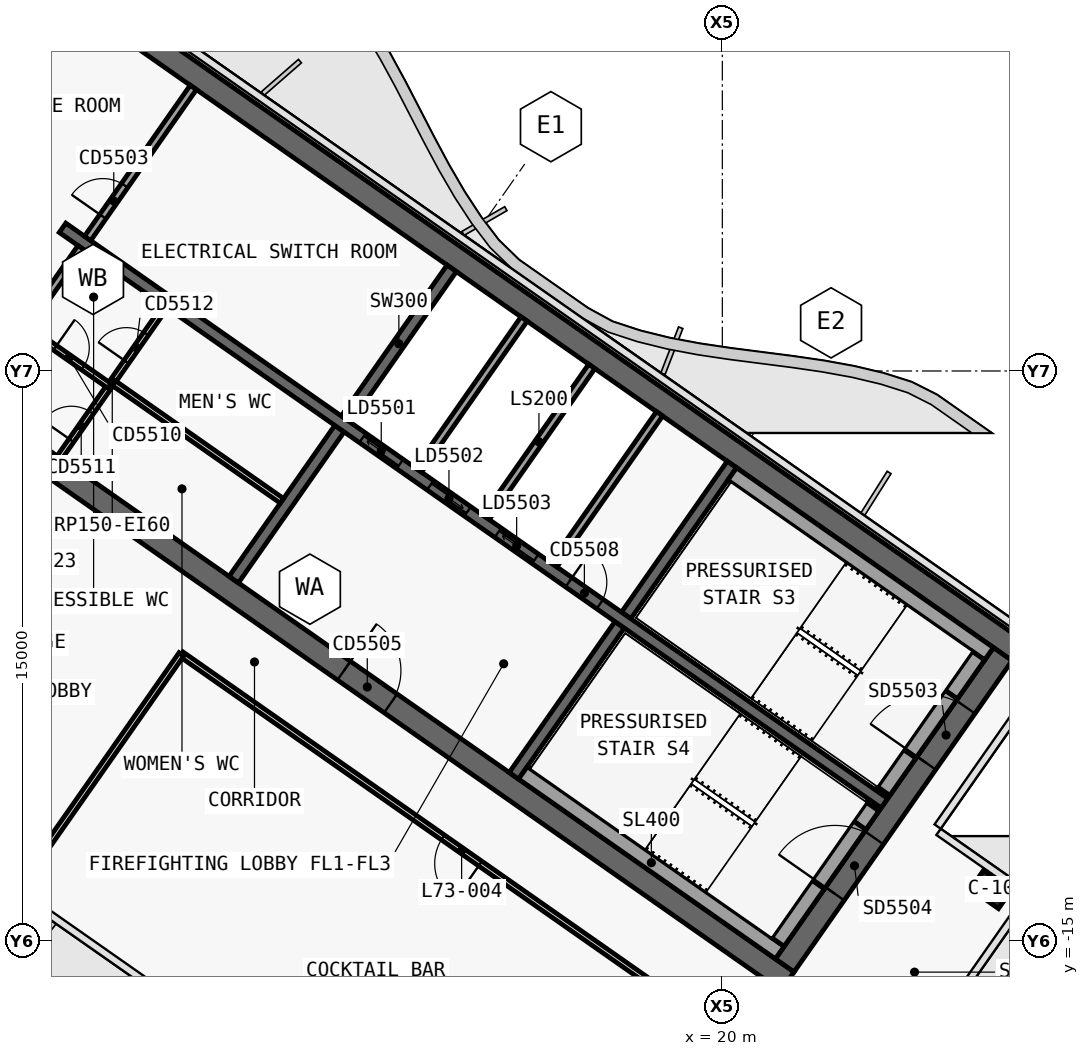
"""IFC4 building model, lengths in metres.
Left out: names, types, materials, properties, quantities, classifications, styles, units other than length and angle.
Written with IfcOpenShell. Run it as: python <this file> out.ifc"""

import sys

from ifc_helpers import new_model, si_unit, direction, frame, frame_2d, origin, origin_2d, place, context, subcontext, project, spatial, polyline, rectangle, outline, extrude, element, fill, save


model = new_model("IFC4")
c1 = context("Model", 3, precision=1e-05, world=origin(), true_north=direction((0.0, 1.0)))
c2 = subcontext(c1, "Body", "Model", "MODEL_VIEW")
j1 = project(units=[si_unit("LENGTHUNIT", "METRE"), si_unit("PLANEANGLEUNIT", "RADIAN")], contexts=[c1])
p1 = place(None, origin())
s1 = spatial("IfcSite", under=j1, at=p1, CompositionType="ELEMENT")
p2 = place(p1, origin())
s2 = spatial("IfcBuilding", under=s1, at=p2, CompositionType="ELEMENT")
p3 = place(p2, frame((0.0, 0.0, 307.3)))
s3 = spatial("IfcBuildingStorey", under=s2, at=p3, CompositionType="ELEMENT", Elevation=307.3)
p4 = place(p3, frame((0.028, 12.066, 0.0), z_axis=(0.0, 0.0, 1.0), x_axis=(0.819151382952, -0.573577380837, 0.0)))
e1 = element("IfcWall", 1, at=p4, inside=s3, PredefinedType="SHEAR", context=c2, shape_type="SweptSolid", body=[
    extrude(outline(polyline([(33.898, 0.3), (0.0, 0.3), (0.42, -0.3), (33.898, -0.3), (33.898, 0.3)])), origin(), (0.0, 0.0, 1.0), 6.0),
])
p5 = place(p3, frame((0.028, -0.874, 0.0), z_axis=(0.0, 0.0, 1.0), x_axis=(0.819150035022, -0.573579305871, 0.0)))
e2 = element("IfcWall", 2, at=p5, inside=s3, PredefinedType="SHEAR", context=c2, shape_type="SweptSolid", body=[
    extrude(outline(polyline([(26.476, 0.3), (0.0, 0.3), (0.42, -0.3), (26.476, -0.3), (26.476, 0.3)])), origin(), (0.0, 0.0, 1.0), 6.0),
])
p6 = place(p5, frame((0.826, 0.0, 0.0)))
e3 = element("IfcOpeningElement", 3, at=p6, cuts=e2, PredefinedType="OPENING", context=c2, shape_type="SweptSolid", body=[
    extrude(rectangle(XDim=1.5, YDim=2.1, at=frame_2d((0.75, 1.05))), frame((0.0, 0.31, 0.0), z_axis=(0.0, -1.0, 0.0), x_axis=(1.0, 0.0, 0.0)), (0.0, 0.0, 1.0), 0.62),
])
p7 = place(p5, frame((12.226, 0.0, 0.0)))
e4 = element("IfcOpeningElement", 4, at=p7, cuts=e2, PredefinedType="OPENING", context=c2, shape_type="SweptSolid", body=[
    extrude(rectangle(XDim=1.5, YDim=2.1, at=frame_2d((0.75, 1.05))), frame((0.0, 0.31, 0.0), z_axis=(0.0, -1.0, 0.0), x_axis=(1.0, 0.0, 0.0)), (0.0, 0.0, 1.0), 0.62),
])
p8 = place(p3, frame((21.642, -15.642, 0.0), z_axis=(0.0, 0.0, 1.0), x_axis=(0.573586866468, 0.819144740944, 0.0)))
e5 = element("IfcWall", 5, at=p8, inside=s3, PredefinedType="SHEAR", context=c2, shape_type="SweptSolid", body=[
    extrude(outline(polyline([(10.0, 0.3), (0.0, 0.3), (0.0, -0.3), (10.0, -0.3), (10.0, 0.3)])), origin(), (0.0, 0.0, 1.0), 6.0),
])
p9 = place(p8, frame((6.5, 0.0, 0.0)))
e6 = element("IfcOpeningElement", 6, at=p9, cuts=e5, PredefinedType="OPENING", context=c2, shape_type="SweptSolid", body=[
    extrude(rectangle(XDim=1.8, YDim=2.1, at=frame_2d((0.9, 1.05))), frame((0.0, 0.31, 0.0), z_axis=(0.0, -1.0, 0.0), x_axis=(1.0, 0.0, 0.0)), (0.0, 0.0, 1.0), 0.62),
])
p10 = place(p8, frame((2.3, 0.0, 0.0)))
e7 = element("IfcOpeningElement", 7, at=p10, cuts=e5, PredefinedType="OPENING", context=c2, shape_type="SweptSolid", body=[
    extrude(rectangle(XDim=1.8, YDim=2.1, at=frame_2d((0.9, 1.05))), frame((0.0, 0.31, 0.0), z_axis=(0.0, -1.0, 0.0), x_axis=(1.0, 0.0, 0.0)), (0.0, 0.0, 1.0), 0.62),
])
p11 = place(p3, frame((7.143, -5.49, 0.0), z_axis=(0.0, 0.0, 1.0), x_axis=(0.573617744349, 0.819123118565, 0.0)))
e8 = element("IfcWall", 8, at=p11, inside=s3, PredefinedType="SHEAR", context=c2, shape_type="SweptSolid", body=[
    extrude(outline(polyline([(0.0, 0.15), (0.0, -0.15), (4.85, -0.15), (4.85, 0.15), (0.0, 0.15)])), origin(), (0.0, 0.0, 1.0), 6.0),
])
p12 = place(p3, frame((10.097, -1.271, 0.0), z_axis=(0.0, 0.0, 1.0), x_axis=(0.573560315113, 0.819163332265, 0.0)))
e9 = element("IfcWall", 9, at=p12, inside=s3, PredefinedType="SHEAR", context=c2, shape_type="SweptSolid", body=[
    extrude(outline(polyline([(4.85, -0.15), (4.85, 0.15), (0.0, 0.15), (0.0, -0.15), (4.85, -0.15)])), origin(), (0.0, 0.0, 1.0), 6.0),
])
p13 = place(p3, frame((14.515, -10.652, 0.0), z_axis=(0.0, 0.0, 1.0), x_axis=(0.573560315113, 0.819163332265, 0.0)))
e10 = element("IfcWall", 10, at=p13, inside=s3, PredefinedType="SHEAR", context=c2, shape_type="SweptSolid", body=[
    extrude(outline(polyline([(0.0, 0.15), (0.0, -0.15), (4.85, -0.15), (4.85, 0.15), (0.0, 0.15)])), origin(), (0.0, 0.0, 1.0), 6.0),
])
p14 = place(p3, frame((17.469, -6.433, 0.0), z_axis=(0.0, 0.0, 1.0), x_axis=(0.573594092424, 0.81913968109, 0.0)))
e11 = element("IfcWall", 11, at=p14, inside=s3, PredefinedType="SHEAR", context=c2, shape_type="SweptSolid", body=[
    extrude(outline(polyline([(4.85, -0.15), (4.85, 0.15), (0.0, 0.15), (0.0, -0.15), (4.85, -0.15)])), origin(), (0.0, 0.0, 1.0), 6.0),
])
p15 = place(p3, frame((2.638, 3.768, 0.0), z_axis=(0.0, 0.0, 1.0), x_axis=(0.819155014212, -0.573572194837, 0.0)))
e12 = element("IfcWall", 12, at=p15, inside=s3, PredefinedType="SHEAR", context=c2, shape_type="SweptSolid", body=[
    extrude(outline(polyline([(0.0, 0.15), (0.0, -0.15), (26.4, -0.15), (26.4, 0.15), (0.0, 0.15)])), origin(), (0.0, 0.0, 1.0), 6.0),
])
p16 = place(p15, frame((9.637, 0.0, 0.0)))
e13 = element("IfcOpeningElement", 13, at=p16, cuts=e12, PredefinedType="OPENING", context=c2, shape_type="SweptSolid", body=[
    extrude(rectangle(XDim=1.2, YDim=2.1, at=frame_2d((0.6, 1.05))), frame((0.0, 0.16, 0.0), z_axis=(0.0, -1.0, 0.0), x_axis=(1.0, 0.0, 0.0)), (0.0, 0.0, 1.0), 0.32),
])
p17 = place(p15, frame((11.812, 0.0, 0.0)))
e14 = element("IfcOpeningElement", 14, at=p17, cuts=e12, PredefinedType="OPENING", context=c2, shape_type="SweptSolid", body=[
    extrude(rectangle(XDim=1.2, YDim=2.1, at=frame_2d((0.6, 1.05))), frame((0.0, 0.16, 0.0), z_axis=(0.0, -1.0, 0.0), x_axis=(1.0, 0.0, 0.0)), (0.0, 0.0, 1.0), 0.32),
])
p18 = place(p15, frame((13.988, 0.0, 0.0)))
e15 = element("IfcOpeningElement", 15, at=p18, cuts=e12, PredefinedType="OPENING", context=c2, shape_type="SweptSolid", body=[
    extrude(rectangle(XDim=1.2, YDim=2.1, at=frame_2d((0.6, 1.05))), frame((0.0, 0.16, 0.0), z_axis=(0.0, -1.0, 0.0), x_axis=(1.0, 0.0, 0.0)), (0.0, 0.0, 1.0), 0.32),
])
p19 = place(p15, frame((16.262, 0.0, 0.0)))
e16 = element("IfcOpeningElement", 16, at=p19, cuts=e12, PredefinedType="OPENING", context=c2, shape_type="SweptSolid", body=[
    extrude(rectangle(XDim=1.0, YDim=2.1, at=frame_2d((0.5, 1.05))), frame((0.0, 0.16, 0.0), z_axis=(0.0, -1.0, 0.0), x_axis=(1.0, 0.0, 0.0)), (0.0, 0.0, 1.0), 0.32),
])
p20 = place(p3, frame((27.07, -13.644, 0.0), z_axis=(0.0, 0.0, 1.0), x_axis=(0.819152044289, -0.573576436351, 0.0)))
e17 = element("IfcColumn", 17, at=p20, inside=s3, PredefinedType="COLUMN", context=c2, shape_type="SweptSolid", body=[
    extrude(rectangle(XDim=0.9, YDim=0.6, at=origin_2d()), origin(), (0.0, 0.0, 1.0), 6.0),
])
p21 = place(p3, frame((12.001, -2.605, 0.0), z_axis=(0.0, 0.0, 1.0), x_axis=(0.573560315113, 0.819163332265, 0.0)))
e18 = element("IfcWall", 18, at=p21, inside=s3, PredefinedType="SOLIDWALL", context=c2, shape_type="SweptSolid", body=[
    extrude(rectangle(XDim=4.85, YDim=0.2, at=frame_2d((2.425, 0.0))), origin(), (0.0, 0.0, 1.0), 6.0),
])
p22 = place(p3, frame((13.783, -3.852, 0.0), z_axis=(0.0, 0.0, 1.0), x_axis=(0.573594092424, 0.81913968109, 0.0)))
e19 = element("IfcWall", 19, at=p22, inside=s3, PredefinedType="SOLIDWALL", context=c2, shape_type="SweptSolid", body=[
    extrude(rectangle(XDim=4.85, YDim=0.2, at=frame_2d((2.425, 0.0))), origin(), (0.0, 0.0, 1.0), 6.0),
])
p23 = place(p3, frame((15.565, -5.1, 0.0), z_axis=(0.0, 0.0, 1.0), x_axis=(0.573560315113, 0.819163332265, 0.0)))
e20 = element("IfcWall", 20, at=p23, inside=s3, PredefinedType="SOLIDWALL", context=c2, shape_type="SweptSolid", body=[
    extrude(rectangle(XDim=4.85, YDim=0.2, at=frame_2d((2.425, 0.0))), origin(), (0.0, 0.0, 1.0), 6.0),
])
p24 = place(p3, frame((2.556, -2.278, 0.0), z_axis=(0.0, 0.0, 1.0), x_axis=(0.573560315113, 0.819163332265, 0.0)))
e21 = element("IfcWall", 21, at=p24, inside=s3, PredefinedType="PARTITIONING", context=c2, shape_type="SweptSolid", body=[
    extrude(rectangle(XDim=4.85, YDim=0.15, at=frame_2d((2.425, 0.0))), origin(), (0.0, 0.0, 1.0), 5.72),
])
p25 = place(p24, frame((0.55, 0.0, 0.0)))
e22 = element("IfcOpeningElement", 22, at=p25, cuts=e21, PredefinedType="OPENING", context=c2, shape_type="SweptSolid", body=[
    extrude(rectangle(XDim=0.9, YDim=2.1, at=frame_2d((0.45, 1.05))), frame((0.0, 0.085, 0.0), z_axis=(0.0, -1.0, 0.0), x_axis=(1.0, 0.0, 0.0)), (0.0, 0.0, 1.0), 0.17),
])
p26 = place(p24, frame((3.075, 0.0, 0.0)))
e23 = element("IfcOpeningElement", 23, at=p26, cuts=e21, PredefinedType="OPENING", context=c2, shape_type="SweptSolid", body=[
    extrude(rectangle(XDim=0.9, YDim=2.1, at=frame_2d((0.45, 1.05))), frame((0.0, 0.085, 0.0), z_axis=(0.0, -1.0, 0.0), x_axis=(1.0, 0.0, 0.0)), (0.0, 0.0, 1.0), 0.17),
])
p27 = place(p3, frame((1.745, 1.097, 0.0), z_axis=(0.0, 0.0, 1.0), x_axis=(0.819178980414, -0.573537965655, 0.0)))
e24 = element("IfcWall", 24, at=p27, inside=s3, PredefinedType="PARTITIONING", context=c2, shape_type="SweptSolid", body=[
    extrude(rectangle(XDim=2.6, YDim=0.15, at=frame_2d((1.3, 0.0))), origin(), (0.0, 0.0, 1.0), 5.72),
])
p28 = place(p27, frame((0.85, 0.0, 0.0)))
e25 = element("IfcOpeningElement", 25, at=p28, cuts=e24, PredefinedType="OPENING", context=c2, shape_type="SweptSolid", body=[
    extrude(rectangle(XDim=0.9, YDim=2.1, at=frame_2d((0.45, 1.05))), frame((0.0, 0.085, 0.0), z_axis=(0.0, -1.0, 0.0), x_axis=(1.0, 0.0, 0.0)), (0.0, 0.0, 1.0), 0.17),
])
p29 = place(p3, frame((3.947, -0.292, 0.0), z_axis=(0.0, 0.0, 1.0), x_axis=(0.819151939971, -0.573576585332, 0.0)))
e26 = element("IfcWall", 26, at=p29, inside=s3, PredefinedType="PARTITIONING", context=c2, shape_type="SweptSolid", body=[
    extrude(rectangle(XDim=5.45, YDim=0.15, at=frame_2d((2.725, 0.0))), origin(), (0.0, 0.0, 1.0), 5.72),
])
p30 = place(p3, frame((20.259, -2.71, 0.0), z_axis=(0.0, 0.0, 1.0), x_axis=(0.81914849389, -0.573581506813, 0.0)))
e27 = element("IfcWall", 27, at=p30, inside=s3, PredefinedType="SOLIDWALL", context=c2, shape_type="SweptSolid", body=[
    extrude(rectangle(XDim=8.25, YDim=0.4, at=frame_2d((4.125, 0.0))), origin(), (0.0, 0.0, 1.0), 5.72),
])
p31 = place(p3, frame((24.244, -11.055, 0.0), z_axis=(0.0, 0.0, 1.0), x_axis=(0.573571582932, 0.819155442668, 0.0)))
e28 = element("IfcWall", 28, at=p31, inside=s3, PredefinedType="SOLIDWALL", context=c2, shape_type="SweptSolid", body=[
    extrude(rectangle(XDim=1.2, YDim=0.4, at=frame_2d((0.6, 0.0))), origin(), (0.0, 0.0, 1.0), 5.72),
])
p32 = place(p3, frame((26.022, -8.515, 0.0), z_axis=(0.0, 0.0, 1.0), x_axis=(0.573619628835, 0.819121798889, 0.0)))
e29 = element("IfcWall", 29, at=p32, inside=s3, PredefinedType="SOLIDWALL", context=c2, shape_type="SweptSolid", body=[
    extrude(rectangle(XDim=1.25, YDim=0.4, at=frame_2d((0.625, 0.0))), origin(), (0.0, 0.0, 1.0), 5.72),
])
p33 = place(p3, frame((24.932, -10.072, 2.15), z_axis=(0.0, 0.0, 1.0), x_axis=(0.573591692345, 0.819141361715, 0.0)))
e30 = element("IfcWall", 30, at=p33, inside=s3, PredefinedType="SOLIDWALL", context=c2, shape_type="SweptSolid", body=[
    extrude(rectangle(XDim=1.9, YDim=0.4, at=frame_2d((0.95, 0.0))), origin(), (0.0, 0.0, 1.0), 3.57),
])
p34 = place(p3, frame((14.753, -10.574, 0.0), z_axis=(0.0, 0.0, 1.0), x_axis=(0.819158229677, -0.573567602601, 0.0)))
e31 = element("IfcWall", 31, at=p34, inside=s3, PredefinedType="SOLIDWALL", context=c2, shape_type="SweptSolid", body=[
    extrude(rectangle(XDim=8.25, YDim=0.4, at=frame_2d((4.125, 0.0))), origin(), (0.0, 0.0, 1.0), 5.72),
])
p35 = place(p3, frame((21.462, -15.028, 0.0), z_axis=(0.0, 0.0, 1.0), x_axis=(0.573559770908, 0.819163713305, 0.0)))
e32 = element("IfcWall", 32, at=p35, inside=s3, PredefinedType="SOLIDWALL", context=c2, shape_type="SweptSolid", body=[
    extrude(rectangle(XDim=1.85, YDim=0.4, at=frame_2d((0.925, 0.0))), origin(), (0.0, 0.0, 1.0), 5.72),
])
p36 = place(p3, frame((23.613, -11.956, 0.0), z_axis=(0.0, 0.0, 1.0), x_axis=(0.573435029941, 0.819251039936, 0.0)))
e33 = element("IfcWall", 33, at=p36, inside=s3, PredefinedType="SOLIDWALL", context=c2, shape_type="SweptSolid", body=[
    extrude(rectangle(XDim=0.6, YDim=0.4, at=frame_2d((0.3, 0.0))), origin(), (0.0, 0.0, 1.0), 5.72),
])
p37 = place(p3, frame((22.523, -13.512, 2.15), z_axis=(0.0, 0.0, 1.0), x_axis=(0.573591692345, 0.819141361715, 0.0)))
e34 = element("IfcWall", 34, at=p37, inside=s3, PredefinedType="SOLIDWALL", context=c2, shape_type="SweptSolid", body=[
    extrude(rectangle(XDim=1.9, YDim=0.4, at=frame_2d((0.95, 0.0))), origin(), (0.0, 0.0, 1.0), 3.57),
])
p38 = place(p3, frame((0.344, -0.729, 0.0), z_axis=(0.0, 0.0, 1.0), x_axis=(0.573560315113, 0.819163332265, 0.0)))
e35 = element("IfcWall", 35, at=p38, inside=s3, PredefinedType="SOLIDWALL", context=c2, shape_type="SweptSolid", body=[
    extrude(rectangle(XDim=4.85, YDim=0.2, at=frame_2d((2.425, 0.0))), origin(), (0.0, 0.0, 1.0), 5.72),
])
p39 = place(p38, frame((0.55, 0.0, 0.0)))
e36 = element("IfcOpeningElement", 36, at=p39, cuts=e35, PredefinedType="OPENING", context=c2, shape_type="SweptSolid", body=[
    extrude(rectangle(XDim=0.9, YDim=2.1, at=frame_2d((0.45, 1.05))), frame((0.0, 0.11, 0.0), z_axis=(0.0, -1.0, 0.0), x_axis=(1.0, 0.0, 0.0)), (0.0, 0.0, 1.0), 0.22),
])
p40 = place(p3, frame((3.298, 3.49, 0.0), z_axis=(0.0, 0.0, 1.0), x_axis=(0.573560315113, 0.819163332265, 0.0)))
e37 = element("IfcWall", 37, at=p40, inside=s3, PredefinedType="SOLIDWALL", context=c2, shape_type="SweptSolid", body=[
    extrude(rectangle(XDim=4.85, YDim=0.2, at=frame_2d((2.425, 0.0))), origin(), (0.0, 0.0, 1.0), 5.72),
])
p41 = place(p40, frame((0.7, 0.0, 0.0)))
e38 = element("IfcOpeningElement", 38, at=p41, cuts=e37, PredefinedType="OPENING", context=c2, shape_type="SweptSolid", body=[
    extrude(rectangle(XDim=1.0, YDim=2.1, at=frame_2d((0.5, 1.05))), frame((0.0, 0.11, 0.0), z_axis=(0.0, -1.0, 0.0), x_axis=(1.0, 0.0, 0.0)), (0.0, 0.0, 1.0), 0.22),
])
p42 = place(p3, frame((20.513, -17.781, 0.0), z_axis=(0.0, 0.0, 1.0), x_axis=(-0.819153544995, 0.573574293115, 0.0)))
e39 = element("IfcWall", 39, at=p42, inside=s3, PredefinedType="PARTITIONING", context=c2, shape_type="SweptSolid", body=[
    extrude(rectangle(XDim=18.002, YDim=0.15, at=frame_2d((9.001, 0.0))), origin(), (0.0, 0.0, 1.0), 5.15),
])
p43 = place(p42, frame((8.401, 0.0, 0.0)))
e40 = element("IfcOpeningElement", 40, at=p43, cuts=e39, PredefinedType="OPENING", context=c2, shape_type="SweptSolid", body=[
    extrude(rectangle(XDim=1.2, YDim=2.4, at=frame_2d((0.6, 1.2))), frame((0.0, 0.085, 0.0), z_axis=(0.0, -1.0, 0.0), x_axis=(1.0, 0.0, 0.0)), (0.0, 0.0, 1.0), 0.17),
])
p44 = place(p3, frame((1.849, -13.051, 0.0), z_axis=(0.0, 0.0, 1.0), x_axis=(0.573577493031, 0.819151304393, 0.0)))
e41 = element("IfcWall", 41, at=p44, inside=s3, PredefinedType="PARTITIONING", context=c2, shape_type="SweptSolid", body=[
    extrude(rectangle(XDim=6.83, YDim=0.15, at=frame_2d((3.415, 0.0))), origin(), (0.0, 0.0, 1.0), 5.15),
])
p45 = place(p16, origin())
e42 = element("IfcDoor", 42, at=p45, inside=s3, OperationType="SLIDING_TO_LEFT", PredefinedType="DOOR", context=c2, shape_type="SweptSolid", body=[
    extrude(rectangle(XDim=1.2, YDim=2.1, at=frame_2d((0.6, 1.05))), frame((0.0, 0.025, 0.0), z_axis=(0.0, -1.0, 0.0), x_axis=(1.0, 0.0, 0.0)), (0.0, 0.0, 1.0), 0.05),
])
fill(e13, e42)
p46 = place(p17, origin())
e43 = element("IfcDoor", 43, at=p46, inside=s3, OperationType="SLIDING_TO_RIGHT", PredefinedType="DOOR", context=c2, shape_type="SweptSolid", body=[
    extrude(rectangle(XDim=1.2, YDim=2.1, at=frame_2d((0.6, 1.05))), frame((0.0, 0.025, 0.0), z_axis=(0.0, -1.0, 0.0), x_axis=(1.0, 0.0, 0.0)), (0.0, 0.0, 1.0), 0.05),
])
fill(e14, e43)
p47 = place(p18, origin())
e44 = element("IfcDoor", 44, at=p47, inside=s3, OperationType="SLIDING_TO_LEFT", PredefinedType="DOOR", context=c2, shape_type="SweptSolid", body=[
    extrude(rectangle(XDim=1.2, YDim=2.1, at=frame_2d((0.6, 1.05))), frame((0.0, 0.025, 0.0), z_axis=(0.0, -1.0, 0.0), x_axis=(1.0, 0.0, 0.0)), (0.0, 0.0, 1.0), 0.05),
])
fill(e15, e44)
p48 = place(p19, origin())
e45 = element("IfcDoor", 45, at=p48, inside=s3, OperationType="SINGLE_SWING_RIGHT", PredefinedType="DOOR", context=c2, shape_type="SweptSolid", body=[
    extrude(rectangle(XDim=1.0, YDim=2.1, at=frame_2d((0.5, 1.05))), frame((0.0, 0.025, 0.0), z_axis=(0.0, -1.0, 0.0), x_axis=(1.0, 0.0, 0.0)), (0.0, 0.0, 1.0), 0.05),
])
fill(e16, e45)
p49 = place(p25, origin())
e46 = element("IfcDoor", 46, at=p49, inside=s3, OperationType="SINGLE_SWING_RIGHT", PredefinedType="DOOR", context=c2, shape_type="SweptSolid", body=[
    extrude(rectangle(XDim=0.9, YDim=2.1, at=frame_2d((0.45, 1.05))), frame((0.0, 0.025, 0.0), z_axis=(0.0, -1.0, 0.0), x_axis=(1.0, 0.0, 0.0)), (0.0, 0.0, 1.0), 0.05),
])
fill(e22, e46)
p50 = place(p28, origin())
e47 = element("IfcDoor", 47, at=p50, inside=s3, OperationType="SINGLE_SWING_RIGHT", PredefinedType="DOOR", context=c2, shape_type="SweptSolid", body=[
    extrude(rectangle(XDim=0.9, YDim=2.1, at=frame_2d((0.45, 1.05))), frame((0.0, 0.025, 0.0), z_axis=(0.0, -1.0, 0.0), x_axis=(1.0, 0.0, 0.0)), (0.0, 0.0, 1.0), 0.05),
])
fill(e25, e47)
p51 = place(p26, origin())
e48 = element("IfcDoor", 48, at=p51, inside=s3, OperationType="SINGLE_SWING_RIGHT", PredefinedType="DOOR", context=c2, shape_type="SweptSolid", body=[
    extrude(rectangle(XDim=0.9, YDim=2.1, at=frame_2d((0.45, 1.05))), frame((0.0, 0.025, 0.0), z_axis=(0.0, -1.0, 0.0), x_axis=(1.0, 0.0, 0.0)), (0.0, 0.0, 1.0), 0.05),
])
fill(e23, e48)
p52 = place(p7, origin())
e49 = element("IfcDoor", 49, at=p52, inside=s3, OperationType="DOUBLE_DOOR_SINGLE_SWING", PredefinedType="DOOR", context=c2, shape_type="SweptSolid", body=[
    extrude(rectangle(XDim=1.5, YDim=2.1, at=frame_2d((0.75, 1.05))), frame((0.0, 0.025, 0.0), z_axis=(0.0, -1.0, 0.0), x_axis=(1.0, 0.0, 0.0)), (0.0, 0.0, 1.0), 0.05),
])
fill(e4, e49)
p53 = place(p9, origin())
e50 = element("IfcDoor", 50, at=p53, inside=s3, OperationType="DOUBLE_DOOR_SINGLE_SWING", PredefinedType="DOOR", context=c2, shape_type="SweptSolid", body=[
    extrude(rectangle(XDim=1.8, YDim=2.1, at=frame_2d((0.9, 1.05))), frame((0.0, 0.025, 0.0), z_axis=(0.0, -1.0, 0.0), x_axis=(1.0, 0.0, 0.0)), (0.0, 0.0, 1.0), 0.05),
])
fill(e6, e50)
p54 = place(p10, origin())
e51 = element("IfcDoor", 51, at=p54, inside=s3, OperationType="DOUBLE_DOOR_SINGLE_SWING", PredefinedType="DOOR", context=c2, shape_type="SweptSolid", body=[
    extrude(rectangle(XDim=1.8, YDim=2.1, at=frame_2d((0.9, 1.05))), frame((0.0, 0.025, 0.0), z_axis=(0.0, -1.0, 0.0), x_axis=(1.0, 0.0, 0.0)), (0.0, 0.0, 1.0), 0.05),
])
fill(e7, e51)
p55 = place(p41, origin())
e52 = element("IfcDoor", 52, at=p55, inside=s3, OperationType="SINGLE_SWING_RIGHT", PredefinedType="DOOR", context=c2, shape_type="SweptSolid", body=[
    extrude(rectangle(XDim=1.0, YDim=2.1, at=frame_2d((0.5, 1.05))), frame((0.0, 0.025, 0.0), z_axis=(0.0, -1.0, 0.0), x_axis=(1.0, 0.0, 0.0)), (0.0, 0.0, 1.0), 0.05),
])
fill(e38, e52)
p56 = place(p43, origin())
e53 = element("IfcDoor", 53, at=p56, inside=s3, OperationType="DOUBLE_DOOR_SINGLE_SWING", PredefinedType="DOOR", context=c2, shape_type="SweptSolid", body=[
    extrude(rectangle(XDim=1.2, YDim=2.4, at=frame_2d((0.6, 1.2))), frame((0.0, 0.025, 0.0), z_axis=(0.0, -1.0, 0.0), x_axis=(1.0, 0.0, 0.0)), (0.0, 0.0, 1.0), 0.05),
])
fill(e40, e53)
save(model, sys.argv[1])
